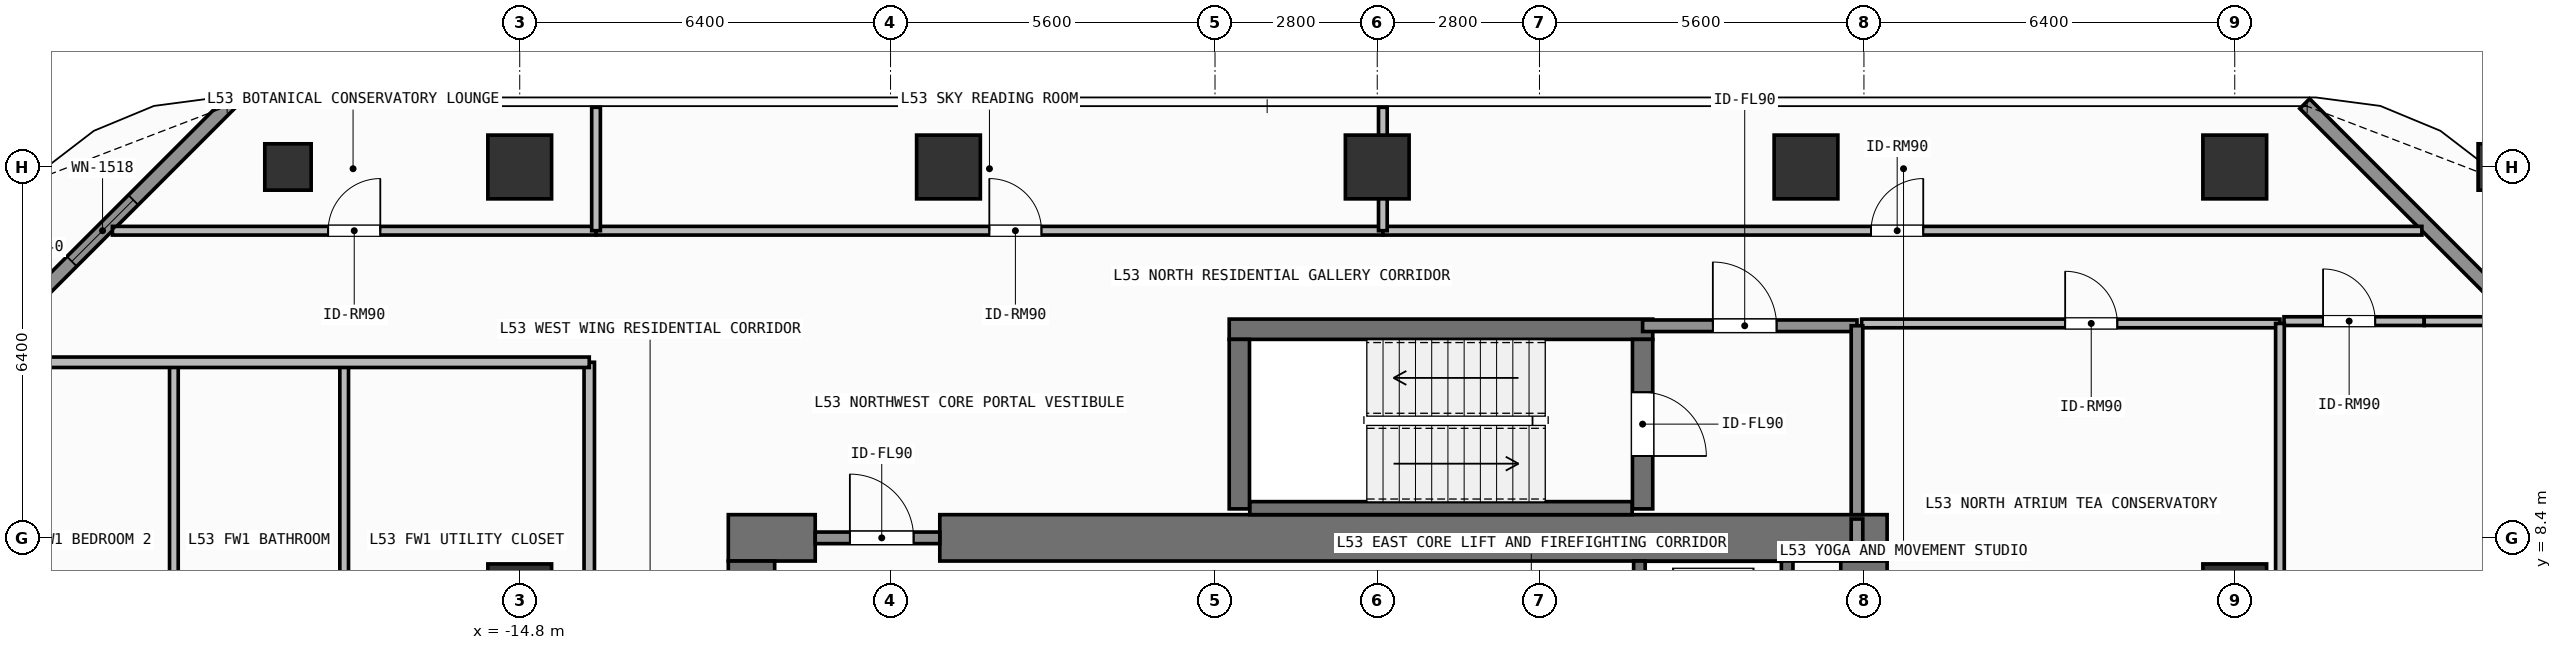
"""IFC4 building model, lengths in metres.
Left out: names, types, materials, properties, quantities, classifications, styles, units other than length and angle.
Written with IfcOpenShell. Run it as: python <this file> out.ifc"""

import sys

from ifc_helpers import new_model, si_unit, direction, frame, frame_2d, origin, origin_2d, place, context, subcontext, project, spatial, rectangle, hollow_rectangle, extrude, element, fill, save


model = new_model("IFC4")
c1 = context("Model", 3, precision=1e-05, world=origin(), true_north=direction((0.0, 1.0)))
c2 = subcontext(c1, "Body", "Model", "MODEL_VIEW")
j1 = project(units=[si_unit("LENGTHUNIT", "METRE"), si_unit("PLANEANGLEUNIT", "RADIAN")], contexts=[c1])
p1 = place(None, origin())
s1 = spatial("IfcSite", under=j1, at=p1, CompositionType="ELEMENT")
p2 = place(p1, origin())
s2 = spatial("IfcBuilding", under=s1, at=p2, CompositionType="ELEMENT")
p3 = place(p2, frame((0.0, 0.0, 215.7)))
s3 = spatial("IfcBuildingStorey", under=s2, at=p3, CompositionType="ELEMENT", Elevation=215.7)
p4 = place(p3, frame((-11.2, 8.4, 0.0), z_axis=(0.0, 0.0, 1.0), x_axis=(1.0, 0.0, 0.0)))
e1 = element("IfcWall", 1, at=p4, inside=s3, PredefinedType="SHEAR", context=c2, shape_type="SweptSolid", body=[
    extrude(rectangle(XDim=1.5, YDim=0.8, at=frame_2d((0.75, 0.0))), origin(), (0.0, 0.0, 1.0), 3.9),
])
p5 = place(p3, frame((-7.55, 8.4, 0.0), z_axis=(0.0, 0.0, 1.0), x_axis=(1.0, 0.0, 0.0)))
e2 = element("IfcWall", 2, at=p5, inside=s3, PredefinedType="SHEAR", context=c2, shape_type="SweptSolid", body=[
    extrude(rectangle(XDim=16.35, YDim=0.8, at=frame_2d((8.175, 0.0))), origin(), (0.0, 0.0, 1.0), 3.9),
])
p6 = place(p3, frame((-10.8, -8.0, 0.0), z_axis=(0.0, 0.0, 1.0), x_axis=(0.0, 1.0, 0.0)))
e3 = element("IfcWall", 3, at=p6, inside=s3, PredefinedType="SHEAR", context=c2, shape_type="SweptSolid", body=[
    extrude(rectangle(XDim=16.0, YDim=0.8, at=frame_2d((8.0, 0.0))), origin(), (0.0, 0.0, 1.0), 3.9),
])
p7 = place(p3, frame((8.4, 5.825, 0.0), z_axis=(0.0, 0.0, 1.0), x_axis=(0.0, 1.0, 0.0)))
e4 = element("IfcWall", 4, at=p7, inside=s3, PredefinedType="SHEAR", context=c2, shape_type="SweptSolid", body=[
    extrude(rectangle(XDim=2.175, YDim=0.8, at=frame_2d((1.087, 0.0))), origin(), (0.0, 0.0, 1.0), 3.9),
])
p8 = place(p3, frame((-2.555, 12.0, 0.0), z_axis=(0.0, 0.0, 1.0), x_axis=(1.0, 0.0, 0.0)))
e5 = element("IfcWall", 5, at=p8, inside=s3, PredefinedType="SHEAR", context=c2, shape_type="SweptSolid", body=[
    extrude(rectangle(XDim=7.31, YDim=0.35, at=frame_2d((3.655, 0.0))), origin(), (0.0, 0.0, 1.0), 3.9),
])
p9 = place(p3, frame((-2.2, 8.913, 0.0), z_axis=(0.0, 0.0, 1.0), x_axis=(1.0, 0.0, 0.0)))
e6 = element("IfcWall", 6, at=p9, inside=s3, PredefinedType="SHEAR", context=c2, shape_type="SweptSolid", body=[
    extrude(rectangle(XDim=6.6, YDim=0.225, at=frame_2d((3.3, 0.0))), origin(), (0.0, 0.0, 1.0), 3.9),
])
p10 = place(p3, frame((-2.38, 8.9, 0.0), z_axis=(0.0, 0.0, 1.0), x_axis=(0.0, 1.0, 0.0)))
e7 = element("IfcWall", 7, at=p10, inside=s3, PredefinedType="SHEAR", context=c2, shape_type="SweptSolid", body=[
    extrude(rectangle(XDim=2.925, YDim=0.35, at=frame_2d((1.462, 0.0))), origin(), (0.0, 0.0, 1.0), 3.9),
])
p11 = place(p3, frame((4.58, 11.825, 0.0), z_axis=(0.0, 0.0, 1.0), x_axis=(0.0, -1.0, 0.0)))
e8 = element("IfcWall", 8, at=p11, inside=s3, PredefinedType="SHEAR", context=c2, shape_type="SweptSolid", body=[
    extrude(rectangle(XDim=2.925, YDim=0.35, at=frame_2d((1.462, 0.0))), origin(), (0.0, 0.0, 1.0), 3.9),
])
p12 = place(p11, frame((0.913, 0.0, 0.0)))
e9 = element("IfcOpeningElement", 9, at=p12, cuts=e8, PredefinedType="OPENING", context=c2, shape_type="SweptSolid", body=[
    extrude(rectangle(XDim=1.1, YDim=2.15, at=frame_2d((0.55, 1.075))), frame((0.0, 0.185, 0.0), z_axis=(0.0, -1.0, 0.0), x_axis=(1.0, 0.0, 0.0)), (0.0, 0.0, 1.0), 0.37),
])
for number, where, z_axis, x_axis in (
    (10, (-14.8, 14.8, 0.0), (0.0, 0.0, 1.0), (1.0, 0.0, 0.0)),
    (11, (-7.4, 14.8, 0.0), (0.0, 0.0, 1.0), (1.0, 0.0, 0.0)),
    (12, (0.0, 14.8, 0.0), (0.0, 0.0, 1.0), (1.0, 0.0, 0.0)),
    (13, (7.4, 14.8, 0.0), (0.0, 0.0, 1.0), (1.0, 0.0, 0.0)),
    (14, (14.8, 14.8, 0.0), (0.0, 0.0, 1.0), (1.0, 0.0, 0.0)),
    (15, (-14.8, 7.4, 0.0), (0.0, 0.0, 1.0), (1.0, 0.0, 0.0)),
    (16, (14.8, 7.4, 0.0), (0.0, 0.0, 1.0), (1.0, 0.0, 0.0)),
):
    element("IfcColumn", number, at=place(p3, frame(where, z_axis=z_axis, x_axis=x_axis)), inside=s3, PredefinedType="COLUMN", context=c2, shape_type="SweptSolid", body=[
        extrude(rectangle(XDim=1.1, YDim=1.1, at=origin_2d()), origin(), (0.0, 0.0, 1.0), 3.9),
    ])
for number, where, z_axis, x_axis in (
    (17, (-18.8, 14.8, 0.0), (0.0, 0.0, 1.0), (1.0, 0.0, 0.0)),
    (18, (19.4, 14.8, 0.0), (0.0, 0.0, 1.0), (1.0, 0.0, 0.0)),
):
    element("IfcColumn", number, at=place(p3, frame(where, z_axis=z_axis, x_axis=x_axis)), inside=s3, PredefinedType="COLUMN", context=c2, shape_type="SweptSolid", body=[
        extrude(hollow_rectangle(XDim=0.8, YDim=0.8, WallThickness=0.036, at=origin_2d()), origin(), (0.0, 0.0, 1.0), 3.9),
    ])
p13 = place(p3, frame((-24.192, 11.508, 0.0), z_axis=(0.0, 0.0, 1.0), x_axis=(0.707106781187, 0.707106781187, 0.0)))
e19 = element("IfcWall", 19, at=p13, inside=s3, PredefinedType="SOLIDWALL", context=c2, shape_type="SweptSolid", body=[
    extrude(rectangle(XDim=6.201, YDim=0.24, at=frame_2d((3.101, 0.0))), origin(), (0.0, 0.0, 1.0), 3.62),
])
p14 = place(p13, frame((2.351, 0.0, 0.8)))
e20 = element("IfcOpeningElement", 20, at=p14, cuts=e19, PredefinedType="OPENING", context=c2, shape_type="SweptSolid", body=[
    extrude(rectangle(XDim=1.5, YDim=1.85, at=frame_2d((0.75, 0.925))), frame((0.0, 0.13, 0.0), z_axis=(0.0, -1.0, 0.0), x_axis=(1.0, 0.0, 0.0)), (0.0, 0.0, 1.0), 0.26),
])
p15 = place(p3, frame((16.008, 15.892, 0.0), z_axis=(0.0, 0.0, 1.0), x_axis=(0.707106781187, -0.707106781187, 0.0)))
e21 = element("IfcWall", 21, at=p15, inside=s3, PredefinedType="SOLIDWALL", context=c2, shape_type="SweptSolid", body=[
    extrude(rectangle(XDim=6.201, YDim=0.24, at=frame_2d((3.101, 0.0))), origin(), (0.0, 0.0, 1.0), 3.62),
])
p16 = place(p3, frame((4.525, 5.825, 0.0), z_axis=(0.0, 0.0, 1.0), x_axis=(0.0, 1.0, 0.0)))
e22 = element("IfcWall", 22, at=p16, inside=s3, PredefinedType="SHEAR", context=c2, shape_type="SweptSolid", body=[
    extrude(rectangle(XDim=2.175, YDim=0.2, at=frame_2d((1.087, 0.0))), origin(), (0.0, 0.0, 1.0), 3.62),
])
p17 = place(p16, frame((0.425, 0.0, 0.0)))
e23 = element("IfcOpeningElement", 23, at=p17, cuts=e22, PredefinedType="OPENING", context=c2, shape_type="SweptSolid", body=[
    extrude(rectangle(XDim=1.1, YDim=2.2, at=frame_2d((0.55, 1.1))), frame((0.0, 0.11, 0.0), z_axis=(0.0, -1.0, 0.0), x_axis=(1.0, 0.0, 0.0)), (0.0, 0.0, 1.0), 0.22),
])
p18 = place(p3, frame((7.075, 5.825, 0.0), z_axis=(0.0, 0.0, 1.0), x_axis=(0.0, 1.0, 0.0)))
e24 = element("IfcWall", 24, at=p18, inside=s3, PredefinedType="SHEAR", context=c2, shape_type="SweptSolid", body=[
    extrude(rectangle(XDim=2.175, YDim=0.2, at=frame_2d((1.087, 0.0))), origin(), (0.0, 0.0, 1.0), 3.62),
])
p19 = place(p3, frame((4.58, 12.06, 0.0), z_axis=(0.0, 0.0, 1.0), x_axis=(1.0, 0.0, 0.0)))
e25 = element("IfcWall", 25, at=p19, inside=s3, PredefinedType="SOLIDWALL", context=c2, shape_type="SweptSolid", body=[
    extrude(rectangle(XDim=3.7, YDim=0.2, at=frame_2d((1.85, 0.0))), origin(), (0.0, 0.0, 1.0), 3.62),
])
p20 = place(p19, frame((1.212, 0.0, 0.0)))
e26 = element("IfcOpeningElement", 26, at=p20, cuts=e25, PredefinedType="OPENING", context=c2, shape_type="SweptSolid", body=[
    extrude(rectangle(XDim=1.1, YDim=2.15, at=frame_2d((0.55, 1.075))), frame((0.0, 0.11, 0.0), z_axis=(0.0, -1.0, 0.0), x_axis=(1.0, 0.0, 0.0)), (0.0, 0.0, 1.0), 0.22),
])
p21 = place(p3, frame((-9.7, 8.4, 0.0), z_axis=(0.0, 0.0, 1.0), x_axis=(1.0, 0.0, 0.0)))
e27 = element("IfcWall", 27, at=p21, inside=s3, PredefinedType="SOLIDWALL", context=c2, shape_type="SweptSolid", body=[
    extrude(rectangle(XDim=2.15, YDim=0.2, at=frame_2d((1.075, 0.0))), origin(), (0.0, 0.0, 1.0), 2.76),
])
p22 = place(p21, frame((0.598, 0.0, 0.0)))
e28 = element("IfcOpeningElement", 28, at=p22, cuts=e27, PredefinedType="OPENING", context=c2, shape_type="SweptSolid", body=[
    extrude(rectangle(XDim=1.1, YDim=2.15, at=frame_2d((0.55, 1.075))), frame((0.0, 0.11, 0.0), z_axis=(0.0, -1.0, 0.0), x_axis=(1.0, 0.0, 0.0)), (0.0, 0.0, 1.0), 0.22),
])
p23 = place(p3, frame((8.36, 12.1, 0.0), z_axis=(0.0, 0.0, 1.0), x_axis=(1.0, 0.0, 0.0)))
e29 = element("IfcWall", 29, at=p23, inside=s3, PredefinedType="PARTITIONING", context=c2, shape_type="SweptSolid", body=[
    extrude(rectangle(XDim=7.22, YDim=0.15, at=frame_2d((3.61, 0.0))), origin(), (0.0, 0.0, 1.0), 3.62),
])
p24 = place(p23, frame((3.513, 0.0, 0.0)))
e30 = element("IfcOpeningElement", 30, at=p24, cuts=e29, PredefinedType="OPENING", context=c2, shape_type="SweptSolid", body=[
    extrude(rectangle(XDim=0.9, YDim=2.1, at=frame_2d((0.45, 1.05))), frame((0.0, 0.085, 0.0), z_axis=(0.0, -1.0, 0.0), x_axis=(1.0, 0.0, 0.0)), (0.0, 0.0, 1.0), 0.17),
])
p25 = place(p3, frame((-21.83, 13.7, 0.0), z_axis=(0.0, 0.0, 1.0), x_axis=(1.0, 0.0, 0.0)))
e31 = element("IfcWall", 31, at=p25, inside=s3, PredefinedType="PARTITIONING", context=c2, shape_type="SweptSolid", body=[
    extrude(rectangle(XDim=8.347, YDim=0.15, at=frame_2d((4.174, 0.0))), origin(), (0.0, 0.0, 1.0), 3.62),
])
p26 = place(p25, frame((3.723, 0.0, 0.0)))
e32 = element("IfcOpeningElement", 32, at=p26, cuts=e31, PredefinedType="OPENING", context=c2, shape_type="SweptSolid", body=[
    extrude(rectangle(XDim=0.9, YDim=2.1, at=frame_2d((0.45, 1.05))), frame((0.0, 0.085, 0.0), z_axis=(0.0, -1.0, 0.0), x_axis=(1.0, 0.0, 0.0)), (0.0, 0.0, 1.0), 0.17),
])
p27 = place(p3, frame((-13.483, 13.7, 0.0), z_axis=(0.0, 0.0, 1.0), x_axis=(1.0, 0.0, 0.0)))
e33 = element("IfcWall", 33, at=p27, inside=s3, PredefinedType="PARTITIONING", context=c2, shape_type="SweptSolid", body=[
    extrude(rectangle(XDim=13.58, YDim=0.15, at=frame_2d((6.79, 0.0))), origin(), (0.0, 0.0, 1.0), 3.62),
])
p28 = place(p27, frame((6.788, 0.0, 0.0)))
e34 = element("IfcOpeningElement", 34, at=p28, cuts=e33, PredefinedType="OPENING", context=c2, shape_type="SweptSolid", body=[
    extrude(rectangle(XDim=0.9, YDim=2.1, at=frame_2d((0.45, 1.05))), frame((0.0, 0.085, 0.0), z_axis=(0.0, -1.0, 0.0), x_axis=(1.0, 0.0, 0.0)), (0.0, 0.0, 1.0), 0.17),
])
p29 = place(p3, frame((0.097, 13.7, 0.0), z_axis=(0.0, 0.0, 1.0), x_axis=(1.0, 0.0, 0.0)))
e35 = element("IfcWall", 35, at=p29, inside=s3, PredefinedType="PARTITIONING", context=c2, shape_type="SweptSolid", body=[
    extrude(rectangle(XDim=17.933, YDim=0.15, at=frame_2d((8.967, 0.0))), origin(), (0.0, 0.0, 1.0), 3.62),
])
p30 = place(p29, frame((8.427, 0.0, 0.0)))
e36 = element("IfcOpeningElement", 36, at=p30, cuts=e35, PredefinedType="OPENING", context=c2, shape_type="SweptSolid", body=[
    extrude(rectangle(XDim=0.9, YDim=2.1, at=frame_2d((0.45, 1.05))), frame((0.0, 0.085, 0.0), z_axis=(0.0, -1.0, 0.0), x_axis=(1.0, 0.0, 0.0)), (0.0, 0.0, 1.0), 0.17),
])
p31 = place(p3, frame((-13.6, -12.12, 0.0), z_axis=(0.0, 0.0, 1.0), x_axis=(0.0, 1.0, 0.0)))
e37 = element("IfcWall", 37, at=p31, inside=s3, PredefinedType="PARTITIONING", context=c2, shape_type="SweptSolid", body=[
    extrude(rectangle(XDim=23.55, YDim=0.18, at=frame_2d((11.775, 0.0))), origin(), (0.0, 0.0, 1.0), 3.62),
])
p32 = place(p31, frame((11.454, 0.0, 0.0)))
e38 = element("IfcOpeningElement", 38, at=p32, cuts=e37, PredefinedType="OPENING", context=c2, shape_type="SweptSolid", body=[
    extrude(rectangle(XDim=1.0, YDim=2.2, at=frame_2d((0.5, 1.1))), frame((0.0, 0.1, 0.0), z_axis=(0.0, -1.0, 0.0), x_axis=(1.0, 0.0, 0.0)), (0.0, 0.0, 1.0), 0.2),
])
p33 = place(p3, frame((15.65, 12.14, 0.0), z_axis=(0.0, 0.0, 1.0), x_axis=(1.0, 0.0, 0.0)))
e39 = element("IfcWall", 39, at=p33, inside=s3, PredefinedType="PARTITIONING", context=c2, shape_type="SweptSolid", body=[
    extrude(rectangle(XDim=2.42, YDim=0.15, at=frame_2d((1.21, 0.0))), origin(), (0.0, 0.0, 1.0), 3.62),
])
p34 = place(p33, frame((0.674, 0.0, 0.0)))
e40 = element("IfcOpeningElement", 40, at=p34, cuts=e39, PredefinedType="OPENING", context=c2, shape_type="SweptSolid", body=[
    extrude(rectangle(XDim=0.9, YDim=2.1, at=frame_2d((0.45, 1.05))), frame((0.0, 0.085, 0.0), z_axis=(0.0, -1.0, 0.0), x_axis=(1.0, 0.0, 0.0)), (0.0, 0.0, 1.0), 0.17),
])
p35 = place(p3, frame((8.28, 8.8, 0.0), z_axis=(0.0, 0.0, 1.0), x_axis=(0.0, 1.0, 0.0)))
e41 = element("IfcWall", 41, at=p35, inside=s3, PredefinedType="SOLIDWALL", context=c2, shape_type="SweptSolid", body=[
    extrude(rectangle(XDim=3.26, YDim=0.2, at=frame_2d((1.63, 0.0))), origin(), (0.0, 0.0, 1.0), 3.62),
])
p36 = place(p3, frame((8.28, 8.1, 0.0), z_axis=(0.0, 0.0, 1.0), x_axis=(0.0, 1.0, 0.0)))
e42 = element("IfcWall", 42, at=p36, inside=s3, PredefinedType="SOLIDWALL", context=c2, shape_type="SweptSolid", body=[
    extrude(rectangle(XDim=0.625, YDim=0.2, at=frame_2d((0.312, 0.0))), origin(), (0.0, 0.0, 1.0), 3.62),
])
p37 = place(p3, frame((15.58, 5.85, 0.0), z_axis=(0.0, 0.0, 1.0), x_axis=(0.0, 1.0, 0.0)))
e43 = element("IfcWall", 43, at=p37, inside=s3, PredefinedType="PARTITIONING", context=c2, shape_type="SweptSolid", body=[
    extrude(rectangle(XDim=6.25, YDim=0.15, at=frame_2d((3.125, 0.0))), origin(), (0.0, 0.0, 1.0), 3.62),
])
for number, where, z_axis, x_axis in (
    (44, (-13.483, 13.7, 0.0), (0.0, 0.0, 1.0), (0.0, 1.0, 0.0)),
    (45, (0.097, 13.7, 0.0), (0.0, 0.0, 1.0), (0.0, 1.0, 0.0)),
):
    element("IfcWall", number, at=place(p3, frame(where, z_axis=z_axis, x_axis=x_axis)), inside=s3, PredefinedType="PARTITIONING", context=c2, shape_type="SweptSolid", body=[
        extrude(rectangle(XDim=2.13, YDim=0.15, at=frame_2d((1.065, 0.0))), origin(), (0.0, 0.0, 1.0), 3.62),
    ])
p38 = place(p3, frame((-17.83, 5.282, 0.0), z_axis=(0.0, 0.0, 1.0), x_axis=(0.0, 1.0, 0.0)))
e46 = element("IfcWall", 46, at=p38, inside=s3, PredefinedType="PARTITIONING", context=c2, shape_type="SweptSolid", body=[
    extrude(rectangle(XDim=6.148, YDim=0.15, at=frame_2d((3.074, 0.0))), origin(), (0.0, 0.0, 1.0), 3.21),
])
p39 = place(p3, frame((-20.769, 5.282, 0.0), z_axis=(0.0, 0.0, 1.0), x_axis=(0.0, 1.0, 0.0)))
e47 = element("IfcWall", 47, at=p39, inside=s3, PredefinedType="PARTITIONING", context=c2, shape_type="SweptSolid", body=[
    extrude(rectangle(XDim=6.148, YDim=0.15, at=frame_2d((3.074, 0.0))), origin(), (0.0, 0.0, 1.0), 3.62),
])
p40 = place(p3, frame((-24.13, 11.43, 0.0), z_axis=(0.0, 0.0, 1.0), x_axis=(1.0, 0.0, 0.0)))
e48 = element("IfcWall", 48, at=p40, inside=s3, PredefinedType="PARTITIONING", context=c2, shape_type="SweptSolid", body=[
    extrude(rectangle(XDim=10.53, YDim=0.18, at=frame_2d((5.265, 0.0))), origin(), (0.0, 0.0, 1.0), 3.62),
])
p41 = place(p3, frame((18.07, 12.14, 0.0), z_axis=(0.0, 0.0, 1.0), x_axis=(1.0, 0.0, 0.0)))
e49 = element("IfcWall", 49, at=p41, inside=s3, PredefinedType="PARTITIONING", context=c2, shape_type="SweptSolid", body=[
    extrude(rectangle(XDim=1.52, YDim=0.15, at=frame_2d((0.76, 0.0))), origin(), (0.0, 0.0, 1.0), 3.62),
])
p42 = place(p14, origin())
e50 = element("IfcWindow", 50, at=p42, inside=s3, PartitioningType="SINGLE_PANEL", PredefinedType="WINDOW", context=c2, shape_type="SweptSolid", body=[
    extrude(rectangle(XDim=1.5, YDim=1.85, at=frame_2d((0.75, 0.925))), frame((0.0, 0.03, 0.0), z_axis=(0.0, -1.0, 0.0), x_axis=(1.0, 0.0, 0.0)), (0.0, 0.0, 1.0), 0.06),
])
fill(e20, e50)
p43 = place(p12, origin())
e51 = element("IfcDoor", 51, at=p43, inside=s3, OperationType="SINGLE_SWING_RIGHT", PredefinedType="DOOR", context=c2, shape_type="SweptSolid", body=[
    extrude(rectangle(XDim=1.1, YDim=2.15, at=frame_2d((0.55, 1.075))), frame((0.0, 0.025, 0.0), z_axis=(0.0, -1.0, 0.0), x_axis=(1.0, 0.0, 0.0)), (0.0, 0.0, 1.0), 0.05),
])
fill(e9, e51)
p44 = place(p20, origin())
e52 = element("IfcDoor", 52, at=p44, inside=s3, OperationType="SINGLE_SWING_LEFT", PredefinedType="DOOR", context=c2, shape_type="SweptSolid", body=[
    extrude(rectangle(XDim=1.1, YDim=2.15, at=frame_2d((0.55, 1.075))), frame((0.0, 0.025, 0.0), z_axis=(0.0, -1.0, 0.0), x_axis=(1.0, 0.0, 0.0)), (0.0, 0.0, 1.0), 0.05),
])
fill(e26, e52)
p45 = place(p22, origin())
e53 = element("IfcDoor", 53, at=p45, inside=s3, OperationType="SINGLE_SWING_LEFT", PredefinedType="DOOR", context=c2, shape_type="SweptSolid", body=[
    extrude(rectangle(XDim=1.1, YDim=2.15, at=frame_2d((0.55, 1.075))), frame((0.0, 0.025, 0.0), z_axis=(0.0, -1.0, 0.0), x_axis=(1.0, 0.0, 0.0)), (0.0, 0.0, 1.0), 0.05),
])
fill(e28, e53)
p46 = place(p24, origin())
e54 = element("IfcDoor", 54, at=p46, inside=s3, OperationType="SINGLE_SWING_LEFT", PredefinedType="DOOR", context=c2, shape_type="SweptSolid", body=[
    extrude(rectangle(XDim=0.9, YDim=2.1, at=frame_2d((0.45, 1.05))), frame((0.0, 0.025, 0.0), z_axis=(0.0, -1.0, 0.0), x_axis=(1.0, 0.0, 0.0)), (0.0, 0.0, 1.0), 0.05),
])
fill(e30, e54)
p47 = place(p26, origin())
e55 = element("IfcDoor", 55, at=p47, inside=s3, OperationType="SINGLE_SWING_RIGHT", PredefinedType="DOOR", context=c2, shape_type="SweptSolid", body=[
    extrude(rectangle(XDim=0.9, YDim=2.1, at=frame_2d((0.45, 1.05))), frame((0.0, 0.025, 0.0), z_axis=(0.0, -1.0, 0.0), x_axis=(1.0, 0.0, 0.0)), (0.0, 0.0, 1.0), 0.05),
])
fill(e32, e55)
p48 = place(p28, origin())
e56 = element("IfcDoor", 56, at=p48, inside=s3, OperationType="SINGLE_SWING_LEFT", PredefinedType="DOOR", context=c2, shape_type="SweptSolid", body=[
    extrude(rectangle(XDim=0.9, YDim=2.1, at=frame_2d((0.45, 1.05))), frame((0.0, 0.025, 0.0), z_axis=(0.0, -1.0, 0.0), x_axis=(1.0, 0.0, 0.0)), (0.0, 0.0, 1.0), 0.05),
])
fill(e34, e56)
p49 = place(p30, origin())
e57 = element("IfcDoor", 57, at=p49, inside=s3, OperationType="SINGLE_SWING_RIGHT", PredefinedType="DOOR", context=c2, shape_type="SweptSolid", body=[
    extrude(rectangle(XDim=0.9, YDim=2.1, at=frame_2d((0.45, 1.05))), frame((0.0, 0.025, 0.0), z_axis=(0.0, -1.0, 0.0), x_axis=(1.0, 0.0, 0.0)), (0.0, 0.0, 1.0), 0.05),
])
fill(e36, e57)
p50 = place(p34, origin())
e58 = element("IfcDoor", 58, at=p50, inside=s3, OperationType="SINGLE_SWING_LEFT", PredefinedType="DOOR", context=c2, shape_type="SweptSolid", body=[
    extrude(rectangle(XDim=0.9, YDim=2.1, at=frame_2d((0.45, 1.05))), frame((0.0, 0.025, 0.0), z_axis=(0.0, -1.0, 0.0), x_axis=(1.0, 0.0, 0.0)), (0.0, 0.0, 1.0), 0.05),
])
fill(e40, e58)
save(model, sys.argv[1])
